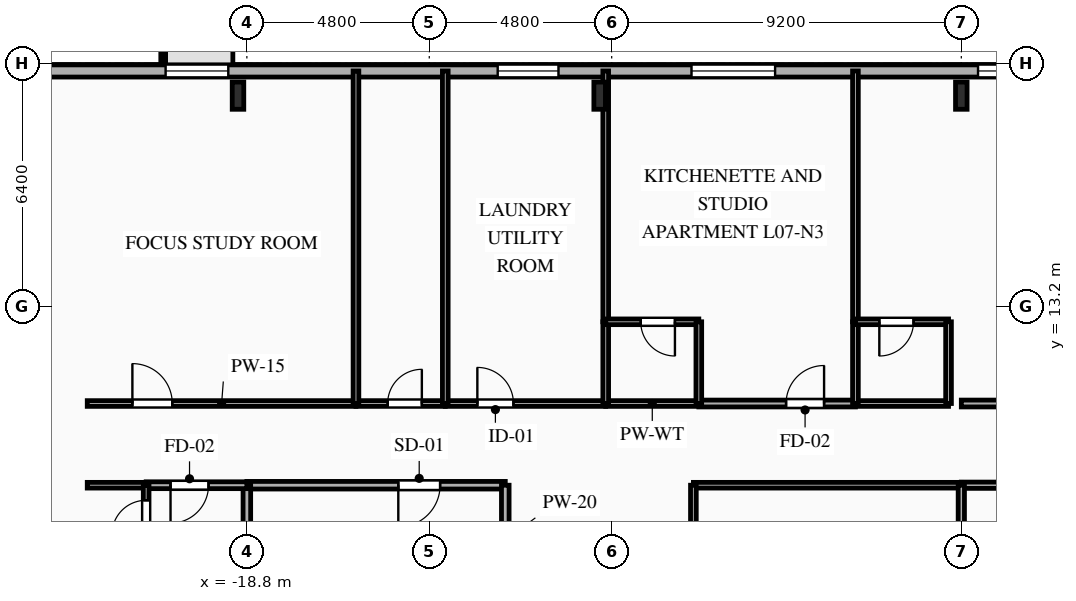
"""IFC4 building model, lengths in metres.
Left out: names, types, materials, properties, quantities, classifications, styles, units other than length and angle.
Written with IfcOpenShell. Run it as: python <this file> out.ifc"""

import sys

from ifc_helpers import new_model, si_unit, direction, frame, frame_2d, origin, origin_2d, place, context, subcontext, project, spatial, rectangle, i_section, extrude, element, fill, save


model = new_model("IFC4")
c1 = context("Model", 3, precision=1e-05, world=origin(), true_north=direction((0.0, 1.0)))
c2 = subcontext(c1, "Body", "Model", "MODEL_VIEW")
j1 = project(units=[si_unit("LENGTHUNIT", "METRE"), si_unit("PLANEANGLEUNIT", "RADIAN")], contexts=[c1])
p1 = place(None, origin())
s1 = spatial("IfcSite", under=j1, at=p1, CompositionType="ELEMENT")
p2 = place(p1, origin())
s2 = spatial("IfcBuilding", under=s1, at=p2, CompositionType="ELEMENT")
p3 = place(p2, frame((0.0, 0.0, 30.35)))
s3 = spatial("IfcBuildingStorey", under=s2, at=p3, CompositionType="ELEMENT", Elevation=30.35)
for number, where, z_axis, x_axis in (
    (1, (0.0, 18.75, 0.0), (0.0, 0.0, 1.0), (1.0, 0.0, 0.0)),
    (2, (-9.517, 18.75, 0.0), (0.0, 0.0, 1.0), (1.0, 0.0, 0.0)),
    (3, (-19.033, 18.75, 0.0), (0.0, 0.0, 1.0), (1.0, 0.0, 0.0)),
):
    element("IfcColumn", number, at=place(p3, frame(where, z_axis=z_axis, x_axis=x_axis)), inside=s3, PredefinedType="COLUMN", context=c2, shape_type="SweptSolid", body=[
        extrude(i_section(OverallWidth=0.304, OverallDepth=0.716, WebThickness=0.021, FlangeThickness=0.04, FilletRadius=0.027, at=origin_2d()), origin(), (0.0, 0.0, 1.0), 3.35),
    ])
p4 = place(p3, frame((-29.2, 19.4, 0.0), z_axis=(0.0, 0.0, 1.0), x_axis=(1.0, 0.0, 0.0)))
e4 = element("IfcWall", 4, at=p4, inside=s3, PredefinedType="SOLIDWALL", context=c2, shape_type="SweptSolid", body=[
    extrude(rectangle(XDim=58.4, YDim=0.32, at=frame_2d((29.2, 0.0))), origin(), (0.0, 0.0, 1.0), 3.035),
])
p5 = place(p4, frame((8.261, 0.0, 0.85)))
e5 = element("IfcOpeningElement", 5, at=p5, cuts=e4, PredefinedType="OPENING", context=c2, shape_type="SweptSolid", body=[
    extrude(rectangle(XDim=1.65, YDim=1.85, at=frame_2d((0.825, 0.925))), frame((0.0, 0.17, 0.0), z_axis=(0.0, -1.0, 0.0), x_axis=(1.0, 0.0, 0.0)), (0.0, 0.0, 1.0), 0.34),
])
p6 = place(p4, frame((17.0, 0.0, 0.85)))
e6 = element("IfcOpeningElement", 6, at=p6, cuts=e4, PredefinedType="OPENING", context=c2, shape_type="SweptSolid", body=[
    extrude(rectangle(XDim=1.6, YDim=1.85, at=frame_2d((0.8, 0.925))), frame((0.0, 0.17, 0.0), z_axis=(0.0, -1.0, 0.0), x_axis=(1.0, 0.0, 0.0)), (0.0, 0.0, 1.0), 0.34),
])
p7 = place(p4, frame((22.1, 0.0, 0.85)))
e7 = element("IfcOpeningElement", 7, at=p7, cuts=e4, PredefinedType="OPENING", context=c2, shape_type="SweptSolid", body=[
    extrude(rectangle(XDim=2.2, YDim=1.85, at=frame_2d((1.1, 0.925))), frame((0.0, 0.17, 0.0), z_axis=(0.0, -1.0, 0.0), x_axis=(1.0, 0.0, 0.0)), (0.0, 0.0, 1.0), 0.34),
])
p8 = place(p4, frame((29.64, 0.0, 0.85)))
e8 = element("IfcOpeningElement", 8, at=p8, cuts=e4, PredefinedType="OPENING", context=c2, shape_type="SweptSolid", body=[
    extrude(rectangle(XDim=2.2, YDim=1.85, at=frame_2d((1.1, 0.925))), frame((0.0, 0.17, 0.0), z_axis=(0.0, -1.0, 0.0), x_axis=(1.0, 0.0, 0.0)), (0.0, 0.0, 1.0), 0.34),
])
p9 = place(p4, frame((35.22, 0.0, 0.85)))
e9 = element("IfcOpeningElement", 9, at=p9, cuts=e4, PredefinedType="OPENING", context=c2, shape_type="SweptSolid", body=[
    extrude(rectangle(XDim=2.2, YDim=1.85, at=frame_2d((1.1, 0.925))), frame((0.0, 0.17, 0.0), z_axis=(0.0, -1.0, 0.0), x_axis=(1.0, 0.0, 0.0)), (0.0, 0.0, 1.0), 0.34),
])
p10 = place(p4, frame((41.78, 0.0, 0.85)))
e10 = element("IfcOpeningElement", 10, at=p10, cuts=e4, PredefinedType="OPENING", context=c2, shape_type="SweptSolid", body=[
    extrude(rectangle(XDim=2.2, YDim=1.85, at=frame_2d((1.1, 0.925))), frame((0.0, 0.17, 0.0), z_axis=(0.0, -1.0, 0.0), x_axis=(1.0, 0.0, 0.0)), (0.0, 0.0, 1.0), 0.34),
])
p11 = place(p4, frame((48.905, 0.0, 0.85)))
e11 = element("IfcOpeningElement", 11, at=p11, cuts=e4, PredefinedType="OPENING", context=c2, shape_type="SweptSolid", body=[
    extrude(rectangle(XDim=1.65, YDim=1.85, at=frame_2d((0.825, 0.925))), frame((0.0, 0.17, 0.0), z_axis=(0.0, -1.0, 0.0), x_axis=(1.0, 0.0, 0.0)), (0.0, 0.0, 1.0), 0.34),
])
p12 = place(p3, frame((-12.0, 8.5, 0.0), z_axis=(0.0, 0.0, 1.0), x_axis=(-1.0, 0.0, 0.0)))
e12 = element("IfcWall", 12, at=p12, inside=s3, PredefinedType="PARTITIONING", context=c2, shape_type="SweptSolid", body=[
    extrude(rectangle(XDim=6.8, YDim=0.2, at=frame_2d((3.4, 0.0))), origin(), (0.0, 0.0, 1.0), 3.035),
])
p13 = place(p12, frame((1.715, 0.0, 0.0)))
e13 = element("IfcOpeningElement", 13, at=p13, cuts=e12, PredefinedType="OPENING", context=c2, shape_type="SweptSolid", body=[
    extrude(rectangle(XDim=1.1, YDim=2.15, at=frame_2d((0.55, 1.075))), frame((0.0, 0.11, 0.0), z_axis=(0.0, -1.0, 0.0), x_axis=(1.0, 0.0, 0.0)), (0.0, 0.0, 1.0), 0.22),
])
p14 = place(p3, frame((-12.0, 5.6, 0.0), z_axis=(0.0, 0.0, 1.0), x_axis=(0.0, 1.0, 0.0)))
e14 = element("IfcWall", 14, at=p14, inside=s3, PredefinedType="PARTITIONING", context=c2, shape_type="SweptSolid", body=[
    extrude(rectangle(XDim=2.9, YDim=0.2, at=frame_2d((1.45, 0.0))), origin(), (0.0, 0.0, 1.0), 3.035),
])
p15 = place(p3, frame((-18.8, 8.5, 0.0), z_axis=(0.0, 0.0, 1.0), x_axis=(0.0, -1.0, 0.0)))
e15 = element("IfcWall", 15, at=p15, inside=s3, PredefinedType="PARTITIONING", context=c2, shape_type="SweptSolid", body=[
    extrude(rectangle(XDim=2.9, YDim=0.2, at=frame_2d((1.45, 0.0))), origin(), (0.0, 0.0, 1.0), 2.52),
])
p16 = place(p3, frame((-18.8, 8.5, 0.0), z_axis=(0.0, 0.0, 1.0), x_axis=(-1.0, 0.0, 0.0)))
e16 = element("IfcWall", 16, at=p16, inside=s3, PredefinedType="PARTITIONING", context=c2, shape_type="SweptSolid", body=[
    extrude(rectangle(XDim=2.65, YDim=0.18, at=frame_2d((1.325, 0.0))), origin(), (0.0, 0.0, 1.0), 3.035),
])
p17 = place(p16, frame((1.009, 0.0, 0.0)))
e17 = element("IfcOpeningElement", 17, at=p17, cuts=e16, PredefinedType="OPENING", context=c2, shape_type="SweptSolid", body=[
    extrude(rectangle(XDim=1.0, YDim=2.15, at=frame_2d((0.5, 1.075))), frame((0.0, 0.1, 0.0), z_axis=(0.0, -1.0, 0.0), x_axis=(1.0, 0.0, 0.0)), (0.0, 0.0, 1.0), 0.2),
])
p18 = place(p3, frame((-21.45, 8.5, 0.0), z_axis=(0.0, 0.0, 1.0), x_axis=(-1.0, 0.0, 0.0)))
e18 = element("IfcWall", 18, at=p18, inside=s3, PredefinedType="PARTITIONING", context=c2, shape_type="SweptSolid", body=[
    extrude(rectangle(XDim=1.55, YDim=0.15, at=frame_2d((0.775, 0.0))), origin(), (0.0, 0.0, 1.0), 3.035),
])
p19 = place(p3, frame((-23.0, 10.65, 0.0), z_axis=(0.0, 0.0, 1.0), x_axis=(1.0, 0.0, 0.0)))
e19 = element("IfcWall", 19, at=p19, inside=s3, PredefinedType="PARTITIONING", context=c2, shape_type="SweptSolid", body=[
    extrude(rectangle(XDim=7.071, YDim=0.15, at=frame_2d((3.536, 0.0))), origin(), (0.0, 0.0, 1.0), 3.035),
])
p20 = place(p19, frame((1.188, 0.0, 0.0)))
e20 = element("IfcOpeningElement", 20, at=p20, cuts=e19, PredefinedType="OPENING", context=c2, shape_type="SweptSolid", body=[
    extrude(rectangle(XDim=1.05, YDim=2.15, at=frame_2d((0.525, 1.075))), frame((0.0, 0.085, 0.0), z_axis=(0.0, -1.0, 0.0), x_axis=(1.0, 0.0, 0.0)), (0.0, 0.0, 1.0), 0.17),
])
p21 = place(p3, frame((-15.929, 10.65, 0.0), z_axis=(0.0, 0.0, 1.0), x_axis=(1.0, 0.0, 0.0)))
e21 = element("IfcWall", 21, at=p21, inside=s3, PredefinedType="PLUMBINGWALL", context=c2, shape_type="SweptSolid", body=[
    extrude(rectangle(XDim=2.35, YDim=0.15, at=frame_2d((1.175, 0.0))), origin(), (0.0, 0.0, 1.0), 3.035),
])
p22 = place(p21, frame((0.834, 0.0, 0.0)))
e22 = element("IfcOpeningElement", 22, at=p22, cuts=e21, PredefinedType="OPENING", context=c2, shape_type="SweptSolid", body=[
    extrude(rectangle(XDim=0.9, YDim=2.1, at=frame_2d((0.45, 1.05))), frame((0.0, 0.085, 0.0), z_axis=(0.0, -1.0, 0.0), x_axis=(1.0, 0.0, 0.0)), (0.0, 0.0, 1.0), 0.17),
])
p23 = place(p3, frame((-13.579, 10.65, 0.0), z_axis=(0.0, 0.0, 1.0), x_axis=(1.0, 0.0, 0.0)))
e23 = element("IfcWall", 23, at=p23, inside=s3, PredefinedType="PARTITIONING", context=c2, shape_type="SweptSolid", body=[
    extrude(rectangle(XDim=4.222, YDim=0.15, at=frame_2d((2.111, 0.0))), origin(), (0.0, 0.0, 1.0), 3.035),
])
p24 = place(p23, frame((0.844, 0.0, 0.0)))
e24 = element("IfcOpeningElement", 24, at=p24, cuts=e23, PredefinedType="OPENING", context=c2, shape_type="SweptSolid", body=[
    extrude(rectangle(XDim=0.95, YDim=2.1, at=frame_2d((0.475, 1.05))), frame((0.0, 0.085, 0.0), z_axis=(0.0, -1.0, 0.0), x_axis=(1.0, 0.0, 0.0)), (0.0, 0.0, 1.0), 0.17),
])
p25 = place(p3, frame((-6.907, 10.65, 0.0), z_axis=(0.0, 0.0, 1.0), x_axis=(1.0, 0.0, 0.0)))
e25 = element("IfcWall", 25, at=p25, inside=s3, PredefinedType="PARTITIONING", context=c2, shape_type="SweptSolid", body=[
    extrude(rectangle(XDim=4.121, YDim=0.18, at=frame_2d((2.061, 0.0))), origin(), (0.0, 0.0, 1.0), 3.035),
])
p26 = place(p25, frame((2.296, 0.0, 0.0)))
e26 = element("IfcOpeningElement", 26, at=p26, cuts=e25, PredefinedType="OPENING", context=c2, shape_type="SweptSolid", body=[
    extrude(rectangle(XDim=1.0, YDim=2.15, at=frame_2d((0.5, 1.075))), frame((0.0, 0.1, 0.0), z_axis=(0.0, -1.0, 0.0), x_axis=(1.0, 0.0, 0.0)), (0.0, 0.0, 1.0), 0.2),
])
for number, where, z_axis, x_axis in (
    (27, (-9.357, 10.65, 0.0), (0.0, 0.0, 1.0), (1.0, 0.0, 0.0)),
    (28, (-2.786, 10.65, 0.0), (0.0, 0.0, 1.0), (1.0, 0.0, 0.0)),
):
    element("IfcWall", number, at=place(p3, frame(where, z_axis=z_axis, x_axis=x_axis)), inside=s3, PredefinedType="PLUMBINGWALL", context=c2, shape_type="SweptSolid", body=[
        extrude(rectangle(XDim=2.45, YDim=0.15, at=frame_2d((1.225, 0.0))), origin(), (0.0, 0.0, 1.0), 3.035),
    ])
p27 = place(p3, frame((0.0, 8.5, 0.0), z_axis=(0.0, 0.0, 1.0), x_axis=(-1.0, 0.0, 0.0)))
e29 = element("IfcWall", 29, at=p27, inside=s3, PredefinedType="PARTITIONING", context=c2, shape_type="SweptSolid", body=[
    extrude(rectangle(XDim=7.05, YDim=0.15, at=frame_2d((3.525, 0.0))), origin(), (0.0, 0.0, 1.0), 3.035),
])
p28 = place(p3, frame((0.0, 10.65, 0.0), z_axis=(0.0, 0.0, 1.0), x_axis=(1.0, 0.0, 0.0)))
e30 = element("IfcWall", 30, at=p28, inside=s3, PredefinedType="PARTITIONING", context=c2, shape_type="SweptSolid", body=[
    extrude(rectangle(XDim=3.786, YDim=0.18, at=frame_2d((1.893, 0.0))), origin(), (0.0, 0.0, 1.0), 3.035),
])
p29 = place(p28, frame((1.393, 0.0, 0.0)))
e31 = element("IfcOpeningElement", 31, at=p29, cuts=e30, PredefinedType="OPENING", context=c2, shape_type="SweptSolid", body=[
    extrude(rectangle(XDim=1.0, YDim=2.15, at=frame_2d((0.5, 1.075))), frame((0.0, 0.1, 0.0), z_axis=(0.0, -1.0, 0.0), x_axis=(1.0, 0.0, 0.0)), (0.0, 0.0, 1.0), 0.2),
])
p30 = place(p3, frame((7.05, 8.5, 0.0), z_axis=(0.0, 0.0, 1.0), x_axis=(-1.0, 0.0, 0.0)))
e32 = element("IfcWall", 32, at=p30, inside=s3, PredefinedType="PARTITIONING", context=c2, shape_type="SweptSolid", body=[
    extrude(rectangle(XDim=7.05, YDim=0.165, at=frame_2d((3.525, 0.0))), origin(), (0.0, 0.0, 1.0), 3.035),
])
p31 = place(p30, frame((4.728, 0.0, 0.0)))
e33 = element("IfcOpeningElement", 33, at=p31, cuts=e32, PredefinedType="OPENING", context=c2, shape_type="SweptSolid", body=[
    extrude(rectangle(XDim=1.15, YDim=2.15, at=frame_2d((0.575, 1.075))), frame((0.0, 0.093, 0.0), z_axis=(0.0, -1.0, 0.0), x_axis=(1.0, 0.0, 0.0)), (0.0, 0.0, 1.0), 0.185),
])
p32 = place(p3, frame((-7.05, 8.5, 0.0), z_axis=(0.0, 0.0, 1.0), x_axis=(0.0, -1.0, 0.0)))
e34 = element("IfcWall", 34, at=p32, inside=s3, PredefinedType="PARTITIONING", context=c2, shape_type="SweptSolid", body=[
    extrude(rectangle(XDim=14.1, YDim=0.15, at=frame_2d((7.05, 0.0))), origin(), (0.0, 0.0, 1.0), 3.035),
])
p33 = place(p32, frame((8.011, 0.0, 0.0)))
e35 = element("IfcOpeningElement", 35, at=p33, cuts=e34, PredefinedType="OPENING", context=c2, shape_type="SweptSolid", body=[
    extrude(rectangle(XDim=1.05, YDim=2.15, at=frame_2d((0.525, 1.075))), frame((0.0, 0.085, 0.0), z_axis=(0.0, -1.0, 0.0), x_axis=(1.0, 0.0, 0.0)), (0.0, 0.0, 1.0), 0.17),
])
p34 = place(p3, frame((-21.45, 6.808, 0.0), z_axis=(0.0, 0.0, 1.0), x_axis=(0.0, 1.0, 0.0)))
e36 = element("IfcWall", 36, at=p34, inside=s3, PredefinedType="PARTITIONING", context=c2, shape_type="SweptSolid", body=[
    extrude(rectangle(XDim=1.692, YDim=0.15, at=frame_2d((0.846, 0.0))), origin(), (0.0, 0.0, 1.0), 3.035),
])
p35 = place(p34, frame((0.396, 0.0, 0.0)))
e37 = element("IfcOpeningElement", 37, at=p35, cuts=e36, PredefinedType="OPENING", context=c2, shape_type="SweptSolid", body=[
    extrude(rectangle(XDim=0.9, YDim=2.1, at=frame_2d((0.45, 1.05))), frame((0.0, 0.085, 0.0), z_axis=(0.0, -1.0, 0.0), x_axis=(1.0, 0.0, 0.0)), (0.0, 0.0, 1.0), 0.17),
])
for number, where, z_axis, x_axis in (
    (38, (-15.929, 19.4, 0.0), (0.0, 0.0, 1.0), (0.0, -1.0, 0.0)),
    (39, (-13.579, 19.4, 0.0), (0.0, 0.0, 1.0), (0.0, -1.0, 0.0)),
):
    element("IfcWall", number, at=place(p3, frame(where, z_axis=z_axis, x_axis=x_axis)), inside=s3, PredefinedType="PLUMBINGWALL", context=c2, shape_type="SweptSolid", body=[
        extrude(rectangle(XDim=8.75, YDim=0.15, at=frame_2d((4.375, 0.0))), origin(), (0.0, 0.0, 1.0), 3.035),
    ])
p36 = place(p3, frame((-9.357, 19.4, 0.0), z_axis=(0.0, 0.0, 1.0), x_axis=(0.0, -1.0, 0.0)))
e40 = element("IfcWall", 40, at=p36, inside=s3, PredefinedType="PARTITIONING", context=c2, shape_type="SweptSolid", body=[
    extrude(rectangle(XDim=6.6, YDim=0.15, at=frame_2d((3.3, 0.0))), origin(), (0.0, 0.0, 1.0), 2.52),
])
p37 = place(p3, frame((-9.357, 12.8, 0.0), z_axis=(0.0, 0.0, 1.0), x_axis=(0.0, -1.0, 0.0)))
e41 = element("IfcWall", 41, at=p37, inside=s3, PredefinedType="PLUMBINGWALL", context=c2, shape_type="SweptSolid", body=[
    extrude(rectangle(XDim=2.15, YDim=0.15, at=frame_2d((1.075, 0.0))), origin(), (0.0, 0.0, 1.0), 2.52),
])
p38 = place(p3, frame((-6.907, 12.8, 0.0), z_axis=(0.0, 0.0, 1.0), x_axis=(-1.0, 0.0, 0.0)))
e42 = element("IfcWall", 42, at=p38, inside=s3, PredefinedType="PLUMBINGWALL", context=c2, shape_type="SweptSolid", body=[
    extrude(rectangle(XDim=2.45, YDim=0.15, at=frame_2d((1.225, 0.0))), origin(), (0.0, 0.0, 1.0), 3.035),
])
p39 = place(p38, frame((0.629, 0.0, 0.0)))
e43 = element("IfcOpeningElement", 43, at=p39, cuts=e42, PredefinedType="OPENING", context=c2, shape_type="SweptSolid", body=[
    extrude(rectangle(XDim=0.9, YDim=2.1, at=frame_2d((0.45, 1.05))), frame((0.0, 0.085, 0.0), z_axis=(0.0, -1.0, 0.0), x_axis=(1.0, 0.0, 0.0)), (0.0, 0.0, 1.0), 0.17),
])
p40 = place(p3, frame((-6.907, 10.65, 0.0), z_axis=(0.0, 0.0, 1.0), x_axis=(0.0, 1.0, 0.0)))
e44 = element("IfcWall", 44, at=p40, inside=s3, PredefinedType="PLUMBINGWALL", context=c2, shape_type="SweptSolid", body=[
    extrude(rectangle(XDim=2.15, YDim=0.15, at=frame_2d((1.075, 0.0))), origin(), (0.0, 0.0, 1.0), 3.035),
])
p41 = place(p3, frame((-2.786, 19.4, 0.0), z_axis=(0.0, 0.0, 1.0), x_axis=(0.0, -1.0, 0.0)))
e45 = element("IfcWall", 45, at=p41, inside=s3, PredefinedType="PARTITIONING", context=c2, shape_type="SweptSolid", body=[
    extrude(rectangle(XDim=6.6, YDim=0.15, at=frame_2d((3.3, 0.0))), origin(), (0.0, 0.0, 1.0), 3.035),
])
p42 = place(p3, frame((-2.786, 12.8, 0.0), z_axis=(0.0, 0.0, 1.0), x_axis=(0.0, -1.0, 0.0)))
e46 = element("IfcWall", 46, at=p42, inside=s3, PredefinedType="PLUMBINGWALL", context=c2, shape_type="SweptSolid", body=[
    extrude(rectangle(XDim=2.15, YDim=0.15, at=frame_2d((1.075, 0.0))), origin(), (0.0, 0.0, 1.0), 3.035),
])
p43 = place(p3, frame((-0.336, 12.8, 0.0), z_axis=(0.0, 0.0, 1.0), x_axis=(-1.0, 0.0, 0.0)))
e47 = element("IfcWall", 47, at=p43, inside=s3, PredefinedType="PLUMBINGWALL", context=c2, shape_type="SweptSolid", body=[
    extrude(rectangle(XDim=2.45, YDim=0.15, at=frame_2d((1.225, 0.0))), origin(), (0.0, 0.0, 1.0), 3.035),
])
p44 = place(p43, frame((0.921, 0.0, 0.0)))
e48 = element("IfcOpeningElement", 48, at=p44, cuts=e47, PredefinedType="OPENING", context=c2, shape_type="SweptSolid", body=[
    extrude(rectangle(XDim=0.9, YDim=2.1, at=frame_2d((0.45, 1.05))), frame((0.0, 0.085, 0.0), z_axis=(0.0, -1.0, 0.0), x_axis=(1.0, 0.0, 0.0)), (0.0, 0.0, 1.0), 0.17),
])
p45 = place(p3, frame((-0.336, 10.65, 0.0), z_axis=(0.0, 0.0, 1.0), x_axis=(0.0, 1.0, 0.0)))
e49 = element("IfcWall", 49, at=p45, inside=s3, PredefinedType="PLUMBINGWALL", context=c2, shape_type="SweptSolid", body=[
    extrude(rectangle(XDim=2.15, YDim=0.15, at=frame_2d((1.075, 0.0))), origin(), (0.0, 0.0, 1.0), 3.035),
])
p46 = place(p3, frame((0.0, 8.5, 0.0), z_axis=(0.0, 0.0, 1.0), x_axis=(0.0, -1.0, 0.0)))
e50 = element("IfcWall", 50, at=p46, inside=s3, PredefinedType="PARTITIONING", context=c2, shape_type="SweptSolid", body=[
    extrude(rectangle(XDim=7.05, YDim=0.165, at=frame_2d((3.525, 0.0))), origin(), (0.0, 0.0, 1.0), 3.035),
])
p47 = place(p5, origin())
e51 = element("IfcWindow", 51, at=p47, inside=s3, PartitioningType="SINGLE_PANEL", PredefinedType="WINDOW", context=c2, shape_type="SweptSolid", body=[
    extrude(rectangle(XDim=1.65, YDim=1.85, at=frame_2d((0.825, 0.925))), frame((0.0, 0.03, 0.0), z_axis=(0.0, -1.0, 0.0), x_axis=(1.0, 0.0, 0.0)), (0.0, 0.0, 1.0), 0.06),
])
fill(e5, e51)
p48 = place(p6, origin())
e52 = element("IfcWindow", 52, at=p48, inside=s3, PartitioningType="SINGLE_PANEL", PredefinedType="WINDOW", context=c2, shape_type="SweptSolid", body=[
    extrude(rectangle(XDim=1.6, YDim=1.85, at=frame_2d((0.8, 0.925))), frame((0.0, 0.03, 0.0), z_axis=(0.0, -1.0, 0.0), x_axis=(1.0, 0.0, 0.0)), (0.0, 0.0, 1.0), 0.06),
])
fill(e6, e52)
p49 = place(p7, origin())
e53 = element("IfcWindow", 53, at=p49, inside=s3, PartitioningType="SINGLE_PANEL", PredefinedType="WINDOW", context=c2, shape_type="SweptSolid", body=[
    extrude(rectangle(XDim=2.2, YDim=1.85, at=frame_2d((1.1, 0.925))), frame((0.0, 0.03, 0.0), z_axis=(0.0, -1.0, 0.0), x_axis=(1.0, 0.0, 0.0)), (0.0, 0.0, 1.0), 0.06),
])
fill(e7, e53)
p50 = place(p8, origin())
e54 = element("IfcWindow", 54, at=p50, inside=s3, PartitioningType="SINGLE_PANEL", PredefinedType="WINDOW", context=c2, shape_type="SweptSolid", body=[
    extrude(rectangle(XDim=2.2, YDim=1.85, at=frame_2d((1.1, 0.925))), frame((0.0, 0.03, 0.0), z_axis=(0.0, -1.0, 0.0), x_axis=(1.0, 0.0, 0.0)), (0.0, 0.0, 1.0), 0.06),
])
fill(e8, e54)
p51 = place(p13, origin())
e55 = element("IfcDoor", 55, at=p51, inside=s3, OperationType="SINGLE_SWING_RIGHT", PredefinedType="DOOR", context=c2, shape_type="SweptSolid", body=[
    extrude(rectangle(XDim=1.1, YDim=2.15, at=frame_2d((0.55, 1.075))), frame((0.0, 0.025, 0.0), z_axis=(0.0, -1.0, 0.0), x_axis=(1.0, 0.0, 0.0)), (0.0, 0.0, 1.0), 0.05),
])
fill(e13, e55)
p52 = place(p17, origin())
e56 = element("IfcDoor", 56, at=p52, inside=s3, OperationType="SINGLE_SWING_RIGHT", PredefinedType="DOOR", context=c2, shape_type="SweptSolid", body=[
    extrude(rectangle(XDim=1.0, YDim=2.15, at=frame_2d((0.5, 1.075))), frame((0.0, 0.025, 0.0), z_axis=(0.0, -1.0, 0.0), x_axis=(1.0, 0.0, 0.0)), (0.0, 0.0, 1.0), 0.05),
])
fill(e17, e56)
p53 = place(p20, origin())
e57 = element("IfcDoor", 57, at=p53, inside=s3, OperationType="SINGLE_SWING_LEFT", PredefinedType="DOOR", context=c2, shape_type="SweptSolid", body=[
    extrude(rectangle(XDim=1.05, YDim=2.15, at=frame_2d((0.525, 1.075))), frame((0.0, 0.025, 0.0), z_axis=(0.0, -1.0, 0.0), x_axis=(1.0, 0.0, 0.0)), (0.0, 0.0, 1.0), 0.05),
])
fill(e20, e57)
p54 = place(p22, origin())
e58 = element("IfcDoor", 58, at=p54, inside=s3, OperationType="SINGLE_SWING_RIGHT", PredefinedType="DOOR", context=c2, shape_type="SweptSolid", body=[
    extrude(rectangle(XDim=0.9, YDim=2.1, at=frame_2d((0.45, 1.05))), frame((0.0, 0.025, 0.0), z_axis=(0.0, -1.0, 0.0), x_axis=(1.0, 0.0, 0.0)), (0.0, 0.0, 1.0), 0.05),
])
fill(e22, e58)
p55 = place(p24, origin())
e59 = element("IfcDoor", 59, at=p55, inside=s3, OperationType="SINGLE_SWING_LEFT", PredefinedType="DOOR", context=c2, shape_type="SweptSolid", body=[
    extrude(rectangle(XDim=0.95, YDim=2.1, at=frame_2d((0.475, 1.05))), frame((0.0, 0.025, 0.0), z_axis=(0.0, -1.0, 0.0), x_axis=(1.0, 0.0, 0.0)), (0.0, 0.0, 1.0), 0.05),
])
fill(e24, e59)
p56 = place(p26, origin())
e60 = element("IfcDoor", 60, at=p56, inside=s3, OperationType="SINGLE_SWING_RIGHT", PredefinedType="DOOR", context=c2, shape_type="SweptSolid", body=[
    extrude(rectangle(XDim=1.0, YDim=2.15, at=frame_2d((0.5, 1.075))), frame((0.0, 0.025, 0.0), z_axis=(0.0, -1.0, 0.0), x_axis=(1.0, 0.0, 0.0)), (0.0, 0.0, 1.0), 0.05),
])
fill(e26, e60)
p57 = place(p35, origin())
e61 = element("IfcDoor", 61, at=p57, inside=s3, OperationType="SINGLE_SWING_LEFT", PredefinedType="DOOR", context=c2, shape_type="SweptSolid", body=[
    extrude(rectangle(XDim=0.9, YDim=2.1, at=frame_2d((0.45, 1.05))), frame((0.0, 0.025, 0.0), z_axis=(0.0, -1.0, 0.0), x_axis=(1.0, 0.0, 0.0)), (0.0, 0.0, 1.0), 0.05),
])
fill(e37, e61)
p58 = place(p39, origin())
e62 = element("IfcDoor", 62, at=p58, inside=s3, OperationType="SINGLE_SWING_LEFT", PredefinedType="DOOR", context=c2, shape_type="SweptSolid", body=[
    extrude(rectangle(XDim=0.9, YDim=2.1, at=frame_2d((0.45, 1.05))), frame((0.0, 0.025, 0.0), z_axis=(0.0, -1.0, 0.0), x_axis=(1.0, 0.0, 0.0)), (0.0, 0.0, 1.0), 0.05),
])
fill(e43, e62)
p59 = place(p44, origin())
e63 = element("IfcDoor", 63, at=p59, inside=s3, OperationType="SINGLE_SWING_RIGHT", PredefinedType="DOOR", context=c2, shape_type="SweptSolid", body=[
    extrude(rectangle(XDim=0.9, YDim=2.1, at=frame_2d((0.45, 1.05))), frame((0.0, 0.025, 0.0), z_axis=(0.0, -1.0, 0.0), x_axis=(1.0, 0.0, 0.0)), (0.0, 0.0, 1.0), 0.05),
])
fill(e48, e63)
save(model, sys.argv[1])
